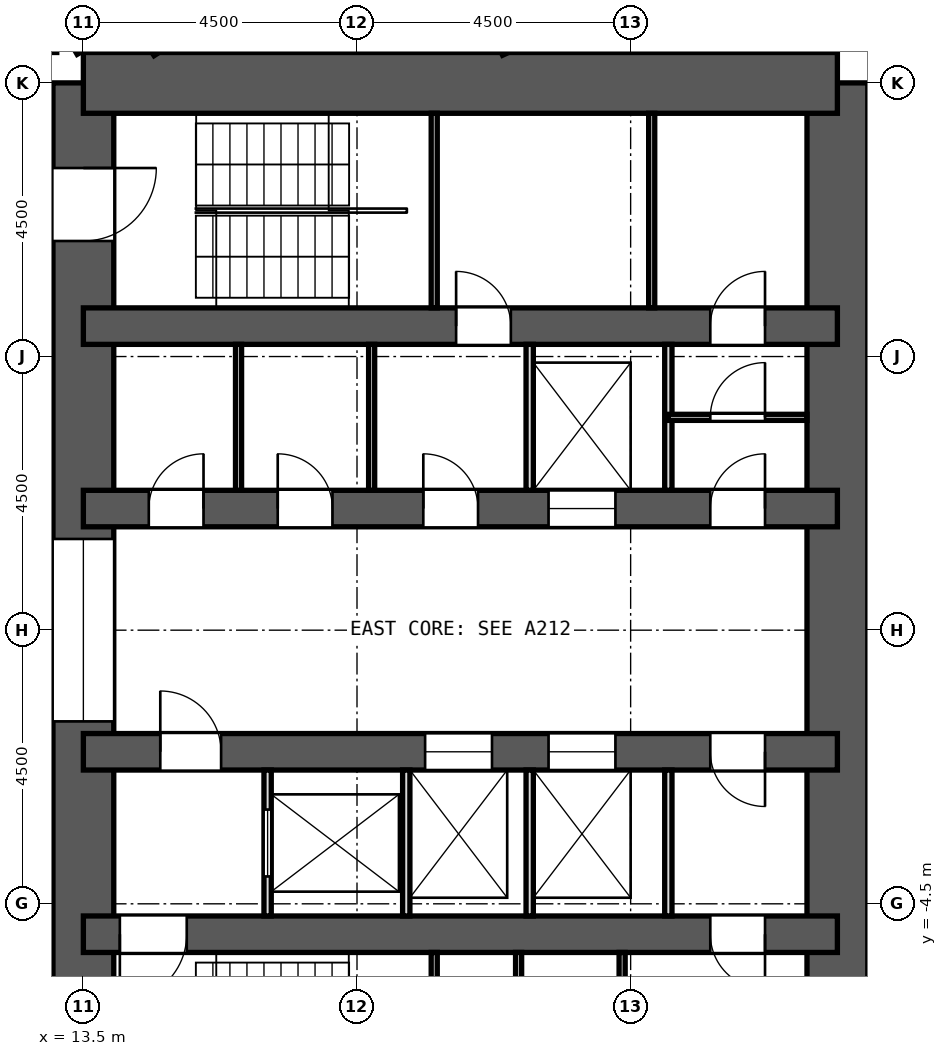
"""IFC4 building model, lengths in metres.
Left out: names, types, materials, properties, quantities, classifications, styles, units other than length and angle.
Written with IfcOpenShell. Run it as: python <this file> out.ifc"""

import sys

from ifc_helpers import new_model, si_unit, direction, frame, frame_2d, origin, place, context, subcontext, project, spatial, polyline, rectangle, outline, extrude, element, fill, save


model = new_model("IFC4")
c1 = context("Model", 3, precision=1e-05, world=origin(), true_north=direction((0.0, 1.0)))
c2 = subcontext(c1, "Body", "Model", "MODEL_VIEW")
j1 = project(units=[si_unit("LENGTHUNIT", "METRE"), si_unit("PLANEANGLEUNIT", "RADIAN")], contexts=[c1])
p1 = place(None, origin())
s1 = spatial("IfcSite", under=j1, at=p1, CompositionType="ELEMENT")
p2 = place(p1, origin())
s2 = spatial("IfcBuilding", under=s1, at=p2, CompositionType="ELEMENT")
p3 = place(p2, frame((0.0, 0.0, 56.0)))
s3 = spatial("IfcBuildingStorey", under=s2, at=p3, CompositionType="ELEMENT", Elevation=56.0)
p4 = place(p3, frame((13.5, -9.0, 0.0), z_axis=(0.0, 0.0, 1.0), x_axis=(0.0, 1.0, 0.0)))
e1 = element("IfcWall", 1, at=p4, inside=s3, PredefinedType="SHEAR", context=c2, shape_type="SweptSolid", body=[
    extrude(rectangle(XDim=18.0, YDim=1.0, at=frame_2d((9.0, 0.0))), origin(), (0.0, 0.0, 1.0), 3.3),
])
p5 = place(p4, frame((15.4, 0.0, 0.0)))
e2 = element("IfcOpeningElement", 2, at=p5, cuts=e1, PredefinedType="OPENING", context=c2, shape_type="SweptSolid", body=[
    extrude(rectangle(XDim=1.2, YDim=2.1, at=frame_2d((0.6, 1.05))), frame((0.0, 0.512, 0.0), z_axis=(0.0, -1.0, 0.0), x_axis=(1.0, 0.0, 0.0)), (0.0, 0.0, 1.0), 1.024),
])
p6 = place(p4, frame((1.4, 0.0, 0.0)))
e3 = element("IfcOpeningElement", 3, at=p6, cuts=e1, PredefinedType="OPENING", context=c2, shape_type="SweptSolid", body=[
    extrude(rectangle(XDim=1.2, YDim=2.1, at=frame_2d((0.6, 1.05))), frame((0.0, 0.512, 0.0), z_axis=(0.0, -1.0, 0.0), x_axis=(1.0, 0.0, 0.0)), (0.0, 0.0, 1.0), 1.024),
])
p7 = place(p4, frame((7.5, 0.0, 0.0)))
e4 = element("IfcOpeningElement", 4, at=p7, cuts=e1, PredefinedType="OPENING", context=c2, shape_type="SweptSolid", body=[
    extrude(rectangle(XDim=3.0, YDim=2.4, at=frame_2d((1.5, 1.2))), frame((0.0, 0.512, 0.0), z_axis=(0.0, -1.0, 0.0), x_axis=(1.0, 0.0, 0.0)), (0.0, 0.0, 1.0), 1.024),
])
p8 = place(p3, frame((25.9, -9.0, 0.0), z_axis=(0.0, 0.0, 1.0), x_axis=(0.0, 1.0, 0.0)))
e5 = element("IfcWall", 5, at=p8, inside=s3, PredefinedType="SHEAR", context=c2, shape_type="SweptSolid", body=[
    extrude(rectangle(XDim=18.0, YDim=1.0, at=frame_2d((9.0, 0.0))), origin(), (0.0, 0.0, 1.0), 3.3),
])
p9 = place(p3, frame((13.5, 9.0, 0.0), z_axis=(0.0, 0.0, 1.0), x_axis=(1.0, 0.0, 0.0)))
e6 = element("IfcWall", 6, at=p9, inside=s3, PredefinedType="SHEAR", context=c2, shape_type="SweptSolid", body=[
    extrude(rectangle(XDim=12.4, YDim=1.0, at=frame_2d((6.2, 0.0))), origin(), (0.0, 0.0, 1.0), 3.3),
])
p10 = place(p3, frame((13.5, 5.0, 0.0), z_axis=(0.0, 0.0, 1.0), x_axis=(1.0, 0.0, 0.0)))
e7 = element("IfcWall", 7, at=p10, inside=s3, PredefinedType="SHEAR", context=c2, shape_type="SweptSolid", body=[
    extrude(rectangle(XDim=12.4, YDim=0.6, at=frame_2d((6.2, 0.0))), origin(), (0.0, 0.0, 1.0), 3.3),
])
p11 = place(p10, frame((6.13, 0.0, 0.0)))
e8 = element("IfcOpeningElement", 8, at=p11, cuts=e7, PredefinedType="OPENING", context=c2, shape_type="SweptSolid", body=[
    extrude(rectangle(XDim=0.9, YDim=2.1, at=frame_2d((0.45, 1.05))), frame((0.0, 0.312, 0.0), z_axis=(0.0, -1.0, 0.0), x_axis=(1.0, 0.0, 0.0)), (0.0, 0.0, 1.0), 0.624),
])
p12 = place(p10, frame((10.31, 0.0, 0.0)))
e9 = element("IfcOpeningElement", 9, at=p12, cuts=e7, PredefinedType="OPENING", context=c2, shape_type="SweptSolid", body=[
    extrude(rectangle(XDim=0.9, YDim=2.1, at=frame_2d((0.45, 1.05))), frame((0.0, 0.312, 0.0), z_axis=(0.0, -1.0, 0.0), x_axis=(1.0, 0.0, 0.0)), (0.0, 0.0, 1.0), 0.624),
])
p13 = place(p3, frame((13.5, -5.0, 0.0), z_axis=(0.0, 0.0, 1.0), x_axis=(1.0, 0.0, 0.0)))
e10 = element("IfcWall", 10, at=p13, inside=s3, PredefinedType="SHEAR", context=c2, shape_type="SweptSolid", body=[
    extrude(rectangle(XDim=12.4, YDim=0.6, at=frame_2d((6.2, 0.0))), origin(), (0.0, 0.0, 1.0), 3.3),
])
p14 = place(p13, frame((10.31, 0.0, 0.0)))
e11 = element("IfcOpeningElement", 11, at=p14, cuts=e10, PredefinedType="OPENING", context=c2, shape_type="SweptSolid", body=[
    extrude(rectangle(XDim=0.9, YDim=2.1, at=frame_2d((0.45, 1.05))), frame((0.0, 0.312, 0.0), z_axis=(0.0, -1.0, 0.0), x_axis=(1.0, 0.0, 0.0)), (0.0, 0.0, 1.0), 0.624),
])
p15 = place(p13, frame((0.6, 0.0, 0.0)))
e12 = element("IfcOpeningElement", 12, at=p15, cuts=e10, PredefinedType="OPENING", context=c2, shape_type="SweptSolid", body=[
    extrude(rectangle(XDim=1.1, YDim=2.1, at=frame_2d((0.55, 1.05))), frame((0.0, 0.312, 0.0), z_axis=(0.0, -1.0, 0.0), x_axis=(1.0, 0.0, 0.0)), (0.0, 0.0, 1.0), 0.624),
])
p16 = place(p3, frame((13.5, 2.0, 0.0), z_axis=(0.0, 0.0, 1.0), x_axis=(1.0, 0.0, 0.0)))
e13 = element("IfcWall", 13, at=p16, inside=s3, PredefinedType="SHEAR", context=c2, shape_type="SweptSolid", body=[
    extrude(rectangle(XDim=12.4, YDim=0.6, at=frame_2d((6.2, 0.0))), origin(), (0.0, 0.0, 1.0), 3.3),
])
p17 = place(p16, frame((7.65, 0.0, 0.0)))
e14 = element("IfcOpeningElement", 14, at=p17, cuts=e13, PredefinedType="OPENING", context=c2, shape_type="SweptSolid", body=[
    extrude(rectangle(XDim=1.1, YDim=2.1, at=frame_2d((0.55, 1.05))), frame((0.0, 0.312, 0.0), z_axis=(0.0, -1.0, 0.0), x_axis=(1.0, 0.0, 0.0)), (0.0, 0.0, 1.0), 0.624),
])
p18 = place(p16, frame((1.076, 0.0, 0.0)))
e15 = element("IfcOpeningElement", 15, at=p18, cuts=e13, PredefinedType="OPENING", context=c2, shape_type="SweptSolid", body=[
    extrude(rectangle(XDim=0.9, YDim=2.1, at=frame_2d((0.45, 1.05))), frame((0.0, 0.312, 0.0), z_axis=(0.0, -1.0, 0.0), x_axis=(1.0, 0.0, 0.0)), (0.0, 0.0, 1.0), 0.624),
])
p19 = place(p16, frame((3.196, 0.0, 0.0)))
e16 = element("IfcOpeningElement", 16, at=p19, cuts=e13, PredefinedType="OPENING", context=c2, shape_type="SweptSolid", body=[
    extrude(rectangle(XDim=0.9, YDim=2.1, at=frame_2d((0.45, 1.05))), frame((0.0, 0.312, 0.0), z_axis=(0.0, -1.0, 0.0), x_axis=(1.0, 0.0, 0.0)), (0.0, 0.0, 1.0), 0.624),
])
p20 = place(p16, frame((5.59, 0.0, 0.0)))
e17 = element("IfcOpeningElement", 17, at=p20, cuts=e13, PredefinedType="OPENING", context=c2, shape_type="SweptSolid", body=[
    extrude(rectangle(XDim=0.9, YDim=2.1, at=frame_2d((0.45, 1.05))), frame((0.0, 0.312, 0.0), z_axis=(0.0, -1.0, 0.0), x_axis=(1.0, 0.0, 0.0)), (0.0, 0.0, 1.0), 0.624),
])
p21 = place(p16, frame((10.31, 0.0, 0.0)))
e18 = element("IfcOpeningElement", 18, at=p21, cuts=e13, PredefinedType="OPENING", context=c2, shape_type="SweptSolid", body=[
    extrude(rectangle(XDim=0.9, YDim=2.1, at=frame_2d((0.45, 1.05))), frame((0.0, 0.312, 0.0), z_axis=(0.0, -1.0, 0.0), x_axis=(1.0, 0.0, 0.0)), (0.0, 0.0, 1.0), 0.624),
])
p22 = place(p3, frame((13.5, -2.0, 0.0), z_axis=(0.0, 0.0, 1.0), x_axis=(1.0, 0.0, 0.0)))
e19 = element("IfcWall", 19, at=p22, inside=s3, PredefinedType="SHEAR", context=c2, shape_type="SweptSolid", body=[
    extrude(rectangle(XDim=12.4, YDim=0.6, at=frame_2d((6.2, 0.0))), origin(), (0.0, 0.0, 1.0), 3.3),
])
p23 = place(p22, frame((5.62, 0.0, 0.0)))
e20 = element("IfcOpeningElement", 20, at=p23, cuts=e19, PredefinedType="OPENING", context=c2, shape_type="SweptSolid", body=[
    extrude(rectangle(XDim=1.1, YDim=2.1, at=frame_2d((0.55, 1.05))), frame((0.0, 0.312, 0.0), z_axis=(0.0, -1.0, 0.0), x_axis=(1.0, 0.0, 0.0)), (0.0, 0.0, 1.0), 0.624),
])
p24 = place(p22, frame((7.65, 0.0, 0.0)))
e21 = element("IfcOpeningElement", 21, at=p24, cuts=e19, PredefinedType="OPENING", context=c2, shape_type="SweptSolid", body=[
    extrude(rectangle(XDim=1.1, YDim=2.1, at=frame_2d((0.55, 1.05))), frame((0.0, 0.312, 0.0), z_axis=(0.0, -1.0, 0.0), x_axis=(1.0, 0.0, 0.0)), (0.0, 0.0, 1.0), 0.624),
])
p25 = place(p22, frame((1.265, 0.0, 0.0)))
e22 = element("IfcOpeningElement", 22, at=p25, cuts=e19, PredefinedType="OPENING", context=c2, shape_type="SweptSolid", body=[
    extrude(rectangle(XDim=1.0, YDim=2.1, at=frame_2d((0.5, 1.05))), frame((0.0, 0.312, 0.0), z_axis=(0.0, -1.0, 0.0), x_axis=(1.0, 0.0, 0.0)), (0.0, 0.0, 1.0), 0.624),
])
p26 = place(p22, frame((10.31, 0.0, 0.0)))
e23 = element("IfcOpeningElement", 23, at=p26, cuts=e19, PredefinedType="OPENING", context=c2, shape_type="SweptSolid", body=[
    extrude(rectangle(XDim=0.9, YDim=2.1, at=frame_2d((0.45, 1.05))), frame((0.0, 0.312, 0.0), z_axis=(0.0, -1.0, 0.0), x_axis=(1.0, 0.0, 0.0)), (0.0, 0.0, 1.0), 0.624),
])
p27 = place(p3, frame((27.523, 7.971, 0.0), z_axis=(0.0, 0.0, 1.0), x_axis=(-0.342028474173, 0.939689588564, 0.0)))
e24 = element("IfcWall", 24, at=p27, inside=s3, PredefinedType="SOLIDWALL", context=c2, shape_type="SweptSolid", body=[
    extrude(rectangle(XDim=3.846, YDim=0.6, at=frame_2d((1.923, 0.0))), origin(), (0.0, 0.0, 1.0), 2.75),
])
p28 = place(p3, origin())
e25 = element("IfcWall", 25, at=p28, inside=s3, PredefinedType="PARAPET", context=c2, shape_type="SweptSolid", body=[
    extrude(outline(polyline([(30.194, 8.09), (28.33, 13.21), (25.605, 17.929), (25.112, 17.584), (27.784, 12.956), (29.612, 7.934), (30.194, 8.09)])), origin(), (0.0, 0.0, 1.0), 0.5),
])
p29 = place(p3, frame((13.035, 10.222, 0.0), z_axis=(0.0, 0.0, 1.0), x_axis=(0.49991670217, -0.866073490468, 0.0)))
e26 = element("IfcWall", 26, at=p29, inside=s3, PredefinedType="PARTITIONING", context=c2, shape_type="SweptSolid", body=[
    extrude(rectangle(XDim=0.834, YDim=0.125, at=frame_2d((0.417, 0.0))), origin(), (0.0, 0.0, 1.0), 2.75),
])
p30 = place(p3, frame((20.373, 9.5, 0.0), z_axis=(0.0, 0.0, 1.0), x_axis=(0.906330751784, 0.422569010187, 0.0)))
e27 = element("IfcWall", 27, at=p30, inside=s3, PredefinedType="PARTITIONING", context=c2, shape_type="SweptSolid", body=[
    extrude(rectangle(XDim=5.111, YDim=0.1, at=frame_2d((2.555, 0.0))), origin(), (0.0, 0.0, 1.0), 2.75),
])
p31 = place(p30, frame((2.709, 0.0, 0.0)))
e28 = element("IfcOpeningElement", 28, at=p31, cuts=e27, PredefinedType="OPENING", context=c2, shape_type="SweptSolid", body=[
    extrude(rectangle(XDim=0.9, YDim=2.1, at=frame_2d((0.45, 1.05))), frame((0.0, 0.062, 0.0), z_axis=(0.0, -1.0, 0.0), x_axis=(1.0, 0.0, 0.0)), (0.0, 0.0, 1.0), 0.124),
])
p32 = place(p3, frame((14.629, 9.5, 0.0), z_axis=(0.0, 0.0, 1.0), x_axis=(0.83882853689, 0.544395706908, 0.0)))
e29 = element("IfcWall", 29, at=p32, inside=s3, PredefinedType="PARTITIONING", context=c2, shape_type="SweptSolid", body=[
    extrude(rectangle(XDim=1.521, YDim=0.125, at=frame_2d((0.76, 0.0))), origin(), (0.0, 0.0, 1.0), 2.75),
])
for number, where, z_axis, x_axis in (
    (30, (16.052, 2.3, 0.0), (0.0, 0.0, 1.0), (0.0, 1.0, 0.0)),
    (31, (18.241, 2.3, 0.0), (0.0, 0.0, 1.0), (0.0, 1.0, 0.0)),
):
    element("IfcWall", number, at=place(p3, frame(where, z_axis=z_axis, x_axis=x_axis)), inside=s3, PredefinedType="PARTITIONING", context=c2, shape_type="SweptSolid", body=[
        extrude(rectangle(XDim=2.4, YDim=0.1, at=frame_2d((1.2, 0.0))), origin(), (0.0, 0.0, 1.0), 2.75),
    ])
for number, where, z_axis, x_axis in (
    (32, (20.84, 2.3, 0.0), (0.0, 0.0, 1.0), (0.0, 1.0, 0.0)),
    (33, (23.12, 2.3, 0.0), (0.0, 0.0, 1.0), (0.0, 1.0, 0.0)),
):
    element("IfcWall", number, at=place(p3, frame(where, z_axis=z_axis, x_axis=x_axis)), inside=s3, PredefinedType="PARTITIONING", context=c2, shape_type="SweptSolid", body=[
        extrude(rectangle(XDim=2.4, YDim=0.12, at=frame_2d((1.2, 0.0))), origin(), (0.0, 0.0, 1.0), 2.75),
    ])
p33 = place(p3, frame((16.53, -4.7, 0.0), z_axis=(0.0, 0.0, 1.0), x_axis=(0.0, 1.0, 0.0)))
e34 = element("IfcWall", 34, at=p33, inside=s3, PredefinedType="PARTITIONING", context=c2, shape_type="SweptSolid", body=[
    extrude(rectangle(XDim=2.4, YDim=0.12, at=frame_2d((1.2, 0.0))), origin(), (0.0, 0.0, 1.0), 2.75),
])
p34 = place(p33, frame((0.65, 0.0, 0.0)))
e35 = element("IfcOpeningElement", 35, at=p34, cuts=e34, PredefinedType="OPENING", context=c2, shape_type="SweptSolid", body=[
    extrude(rectangle(XDim=1.1, YDim=2.1, at=frame_2d((0.55, 1.05))), frame((0.0, 0.072, 0.0), z_axis=(0.0, -1.0, 0.0), x_axis=(1.0, 0.0, 0.0)), (0.0, 0.0, 1.0), 0.144),
])
for number, where, z_axis, x_axis in (
    (36, (18.81, -4.7, 0.0), (0.0, 0.0, 1.0), (0.0, 1.0, 0.0)),
    (37, (20.84, -4.7, 0.0), (0.0, 0.0, 1.0), (0.0, 1.0, 0.0)),
    (38, (23.12, -4.7, 0.0), (0.0, 0.0, 1.0), (0.0, 1.0, 0.0)),
):
    element("IfcWall", number, at=place(p3, frame(where, z_axis=z_axis, x_axis=x_axis)), inside=s3, PredefinedType="PARTITIONING", context=c2, shape_type="SweptSolid", body=[
        extrude(rectangle(XDim=2.4, YDim=0.12, at=frame_2d((1.2, 0.0))), origin(), (0.0, 0.0, 1.0), 2.75),
    ])
p35 = place(p3, frame((23.12, 3.5, 0.0), z_axis=(0.0, 0.0, 1.0), x_axis=(1.0, 0.0, 0.0)))
e39 = element("IfcWall", 39, at=p35, inside=s3, PredefinedType="PARTITIONING", context=c2, shape_type="SweptSolid", body=[
    extrude(rectangle(XDim=2.28, YDim=0.1, at=frame_2d((1.14, 0.0))), origin(), (0.0, 0.0, 1.0), 2.75),
])
p36 = place(p35, frame((0.69, 0.0, 0.0)))
e40 = element("IfcOpeningElement", 40, at=p36, cuts=e39, PredefinedType="OPENING", context=c2, shape_type="SweptSolid", body=[
    extrude(rectangle(XDim=0.9, YDim=2.1, at=frame_2d((0.45, 1.05))), frame((0.0, 0.062, 0.0), z_axis=(0.0, -1.0, 0.0), x_axis=(1.0, 0.0, 0.0)), (0.0, 0.0, 1.0), 0.124),
])
for number, where, z_axis, x_axis in (
    (41, (19.27, 5.3, 0.0), (0.0, 0.0, 1.0), (0.0, 1.0, 0.0)),
    (42, (22.846, 5.3, 0.0), (0.0, 0.0, 1.0), (0.0, 1.0, 0.0)),
    (43, (19.27, -8.5, 0.0), (0.0, 0.0, 1.0), (0.0, 1.0, 0.0)),
):
    element("IfcWall", number, at=place(p3, frame(where, z_axis=z_axis, x_axis=x_axis)), inside=s3, PredefinedType="PARTITIONING", context=c2, shape_type="SweptSolid", body=[
        extrude(rectangle(XDim=3.2, YDim=0.1, at=frame_2d((1.6, 0.0))), origin(), (0.0, 0.0, 1.0), 2.75),
    ])
p37 = place(p3, frame((20.658, -8.5, 0.0), z_axis=(0.0, 0.0, 1.0), x_axis=(0.0, 1.0, 0.0)))
e44 = element("IfcWall", 44, at=p37, inside=s3, PredefinedType="PARTITIONING", context=c2, shape_type="SweptSolid", body=[
    extrude(rectangle(XDim=3.2, YDim=0.1, at=frame_2d((1.6, 0.0))), origin(), (0.0, 0.0, 1.0), 2.75),
])
p38 = place(p37, frame((1.15, 0.0, 0.0)))
e45 = element("IfcOpeningElement", 45, at=p38, cuts=e44, PredefinedType="OPENING", context=c2, shape_type="SweptSolid", body=[
    extrude(rectangle(XDim=0.9, YDim=2.1, at=frame_2d((0.45, 1.05))), frame((0.0, 0.062, 0.0), z_axis=(0.0, -1.0, 0.0), x_axis=(1.0, 0.0, 0.0)), (0.0, 0.0, 1.0), 0.124),
])
p39 = place(p3, frame((22.36, -8.5, 0.0), z_axis=(0.0, 0.0, 1.0), x_axis=(0.0, 1.0, 0.0)))
e46 = element("IfcWall", 46, at=p39, inside=s3, PredefinedType="PARTITIONING", context=c2, shape_type="SweptSolid", body=[
    extrude(rectangle(XDim=3.2, YDim=0.1, at=frame_2d((1.6, 0.0))), origin(), (0.0, 0.0, 1.0), 2.75),
])
p40 = place(p39, frame((1.15, 0.0, 0.0)))
e47 = element("IfcOpeningElement", 47, at=p40, cuts=e46, PredefinedType="OPENING", context=c2, shape_type="SweptSolid", body=[
    extrude(rectangle(XDim=0.9, YDim=2.1, at=frame_2d((0.45, 1.05))), frame((0.0, 0.062, 0.0), z_axis=(0.0, -1.0, 0.0), x_axis=(1.0, 0.0, 0.0)), (0.0, 0.0, 1.0), 0.124),
])
p41 = place(p17, origin())
e48 = element("IfcDoor", 48, at=p41, inside=s3, OperationType="DOUBLE_DOOR_SLIDING", PredefinedType="DOOR", context=c2, shape_type="SweptSolid", body=[
    extrude(rectangle(XDim=1.1, YDim=2.1, at=frame_2d((0.55, 1.05))), frame((0.0, 0.025, 0.0), z_axis=(0.0, -1.0, 0.0), x_axis=(1.0, 0.0, 0.0)), (0.0, 0.0, 1.0), 0.05),
])
fill(e14, e48)
p42 = place(p34, origin())
e49 = element("IfcDoor", 49, at=p42, inside=s3, OperationType="DOUBLE_DOOR_SLIDING", PredefinedType="DOOR", context=c2, shape_type="SweptSolid", body=[
    extrude(rectangle(XDim=1.1, YDim=2.1, at=frame_2d((0.55, 1.05))), frame((0.0, 0.025, 0.0), z_axis=(0.0, -1.0, 0.0), x_axis=(1.0, 0.0, 0.0)), (0.0, 0.0, 1.0), 0.05),
])
fill(e35, e49)
p43 = place(p23, origin())
e50 = element("IfcDoor", 50, at=p43, inside=s3, OperationType="DOUBLE_DOOR_SLIDING", PredefinedType="DOOR", context=c2, shape_type="SweptSolid", body=[
    extrude(rectangle(XDim=1.1, YDim=2.1, at=frame_2d((0.55, 1.05))), frame((0.0, 0.025, 0.0), z_axis=(0.0, -1.0, 0.0), x_axis=(1.0, 0.0, 0.0)), (0.0, 0.0, 1.0), 0.05),
])
fill(e20, e50)
p44 = place(p24, origin())
e51 = element("IfcDoor", 51, at=p44, inside=s3, OperationType="DOUBLE_DOOR_SLIDING", PredefinedType="DOOR", context=c2, shape_type="SweptSolid", body=[
    extrude(rectangle(XDim=1.1, YDim=2.1, at=frame_2d((0.55, 1.05))), frame((0.0, 0.025, 0.0), z_axis=(0.0, -1.0, 0.0), x_axis=(1.0, 0.0, 0.0)), (0.0, 0.0, 1.0), 0.05),
])
fill(e21, e51)
p45 = place(p18, origin())
e52 = element("IfcDoor", 52, at=p45, inside=s3, OperationType="SINGLE_SWING_RIGHT", PredefinedType="DOOR", context=c2, shape_type="SweptSolid", body=[
    extrude(rectangle(XDim=0.9, YDim=2.1, at=frame_2d((0.45, 1.05))), frame((0.0, 0.025, 0.0), z_axis=(0.0, -1.0, 0.0), x_axis=(1.0, 0.0, 0.0)), (0.0, 0.0, 1.0), 0.05),
])
fill(e15, e52)
p46 = place(p19, origin())
e53 = element("IfcDoor", 53, at=p46, inside=s3, OperationType="SINGLE_SWING_LEFT", PredefinedType="DOOR", context=c2, shape_type="SweptSolid", body=[
    extrude(rectangle(XDim=0.9, YDim=2.1, at=frame_2d((0.45, 1.05))), frame((0.0, 0.025, 0.0), z_axis=(0.0, -1.0, 0.0), x_axis=(1.0, 0.0, 0.0)), (0.0, 0.0, 1.0), 0.05),
])
fill(e16, e53)
p47 = place(p20, origin())
e54 = element("IfcDoor", 54, at=p47, inside=s3, OperationType="SINGLE_SWING_LEFT", PredefinedType="DOOR", context=c2, shape_type="SweptSolid", body=[
    extrude(rectangle(XDim=0.9, YDim=2.1, at=frame_2d((0.45, 1.05))), frame((0.0, 0.025, 0.0), z_axis=(0.0, -1.0, 0.0), x_axis=(1.0, 0.0, 0.0)), (0.0, 0.0, 1.0), 0.05),
])
fill(e17, e54)
p48 = place(p21, origin())
e55 = element("IfcDoor", 55, at=p48, inside=s3, OperationType="SINGLE_SWING_RIGHT", PredefinedType="DOOR", context=c2, shape_type="SweptSolid", body=[
    extrude(rectangle(XDim=0.9, YDim=2.1, at=frame_2d((0.45, 1.05))), frame((0.0, 0.025, 0.0), z_axis=(0.0, -1.0, 0.0), x_axis=(1.0, 0.0, 0.0)), (0.0, 0.0, 1.0), 0.05),
])
fill(e18, e55)
p49 = place(p25, origin())
e56 = element("IfcDoor", 56, at=p49, inside=s3, OperationType="SINGLE_SWING_LEFT", PredefinedType="DOOR", context=c2, shape_type="SweptSolid", body=[
    extrude(rectangle(XDim=1.0, YDim=2.1, at=frame_2d((0.5, 1.05))), frame((0.0, 0.025, 0.0), z_axis=(0.0, -1.0, 0.0), x_axis=(1.0, 0.0, 0.0)), (0.0, 0.0, 1.0), 0.05),
])
fill(e22, e56)
p50 = place(p26, frame((0.9, 0.0, 0.0), z_axis=(0.0, 0.0, 1.0), x_axis=(-1.0, 0.0, 0.0)))
e57 = element("IfcDoor", 57, at=p50, inside=s3, OperationType="SINGLE_SWING_LEFT", PredefinedType="DOOR", context=c2, shape_type="SweptSolid", body=[
    extrude(rectangle(XDim=0.9, YDim=2.1, at=frame_2d((0.45, 1.05))), frame((0.0, 0.025, 0.0), z_axis=(0.0, -1.0, 0.0), x_axis=(1.0, 0.0, 0.0)), (0.0, 0.0, 1.0), 0.05),
])
fill(e23, e57)
p51 = place(p36, origin())
e58 = element("IfcDoor", 58, at=p51, inside=s3, OperationType="SINGLE_SWING_RIGHT", PredefinedType="DOOR", context=c2, shape_type="SweptSolid", body=[
    extrude(rectangle(XDim=0.9, YDim=2.1, at=frame_2d((0.45, 1.05))), frame((0.0, 0.025, 0.0), z_axis=(0.0, -1.0, 0.0), x_axis=(1.0, 0.0, 0.0)), (0.0, 0.0, 1.0), 0.05),
])
fill(e40, e58)
p52 = place(p11, origin())
e59 = element("IfcDoor", 59, at=p52, inside=s3, OperationType="SINGLE_SWING_LEFT", PredefinedType="DOOR", context=c2, shape_type="SweptSolid", body=[
    extrude(rectangle(XDim=0.9, YDim=2.1, at=frame_2d((0.45, 1.05))), frame((0.0, 0.025, 0.0), z_axis=(0.0, -1.0, 0.0), x_axis=(1.0, 0.0, 0.0)), (0.0, 0.0, 1.0), 0.05),
])
fill(e8, e59)
p53 = place(p12, origin())
e60 = element("IfcDoor", 60, at=p53, inside=s3, OperationType="SINGLE_SWING_RIGHT", PredefinedType="DOOR", context=c2, shape_type="SweptSolid", body=[
    extrude(rectangle(XDim=0.9, YDim=2.1, at=frame_2d((0.45, 1.05))), frame((0.0, 0.025, 0.0), z_axis=(0.0, -1.0, 0.0), x_axis=(1.0, 0.0, 0.0)), (0.0, 0.0, 1.0), 0.05),
])
fill(e9, e60)
p54 = place(p14, frame((0.9, 0.0, 0.0), z_axis=(0.0, 0.0, 1.0), x_axis=(-1.0, 0.0, 0.0)))
e61 = element("IfcDoor", 61, at=p54, inside=s3, OperationType="SINGLE_SWING_LEFT", PredefinedType="DOOR", context=c2, shape_type="SweptSolid", body=[
    extrude(rectangle(XDim=0.9, YDim=2.1, at=frame_2d((0.45, 1.05))), frame((0.0, 0.025, 0.0), z_axis=(0.0, -1.0, 0.0), x_axis=(1.0, 0.0, 0.0)), (0.0, 0.0, 1.0), 0.05),
])
fill(e11, e61)
p55 = place(p15, frame((1.1, 0.0, 0.0), z_axis=(0.0, 0.0, 1.0), x_axis=(-1.0, 0.0, 0.0)))
e62 = element("IfcDoor", 62, at=p55, inside=s3, OperationType="SINGLE_SWING_RIGHT", PredefinedType="DOOR", context=c2, shape_type="SweptSolid", body=[
    extrude(rectangle(XDim=1.1, YDim=2.1, at=frame_2d((0.55, 1.05))), frame((0.0, 0.025, 0.0), z_axis=(0.0, -1.0, 0.0), x_axis=(1.0, 0.0, 0.0)), (0.0, 0.0, 1.0), 0.05),
])
fill(e12, e62)
p56 = place(p5, frame((1.2, 0.0, 0.0), z_axis=(0.0, 0.0, 1.0), x_axis=(-1.0, 0.0, 0.0)))
e63 = element("IfcDoor", 63, at=p56, inside=s3, OperationType="SINGLE_SWING_LEFT", PredefinedType="DOOR", context=c2, shape_type="SweptSolid", body=[
    extrude(rectangle(XDim=1.2, YDim=2.1, at=frame_2d((0.6, 1.05))), frame((0.0, 0.025, 0.0), z_axis=(0.0, -1.0, 0.0), x_axis=(1.0, 0.0, 0.0)), (0.0, 0.0, 1.0), 0.05),
])
fill(e2, e63)
p57 = place(p7, origin())
e64 = element("IfcDoor", 64, at=p57, inside=s3, OperationType="DOUBLE_DOOR_SLIDING", PredefinedType="DOOR", context=c2, shape_type="SweptSolid", body=[
    extrude(rectangle(XDim=3.0, YDim=2.4, at=frame_2d((1.5, 1.2))), frame((0.0, 0.025, 0.0), z_axis=(0.0, -1.0, 0.0), x_axis=(1.0, 0.0, 0.0)), (0.0, 0.0, 1.0), 0.05),
])
fill(e4, e64)
save(model, sys.argv[1])
